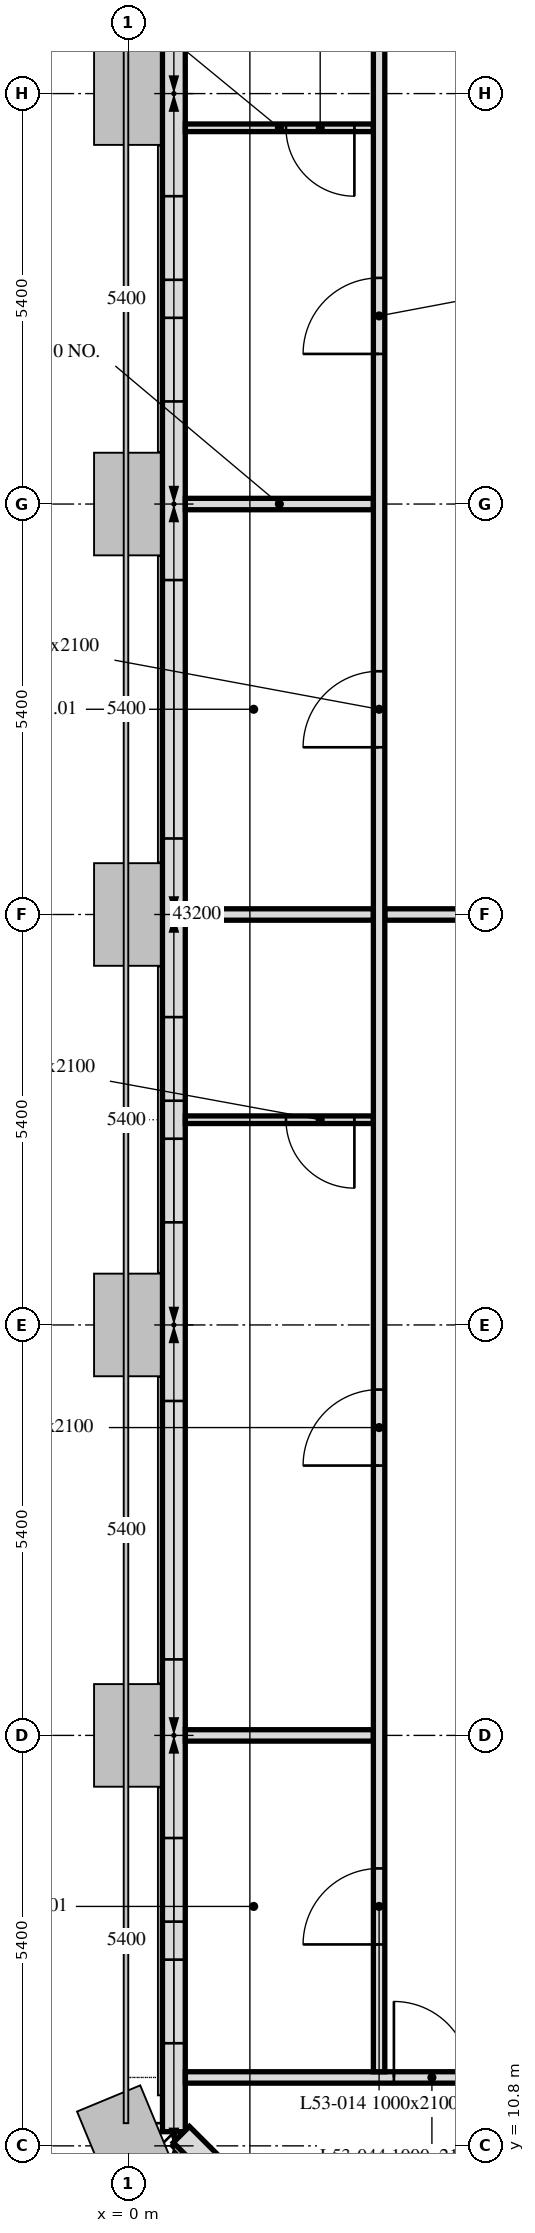
"""IFC4 building model, lengths in metres.
Left out: names, types, materials, properties, quantities, classifications, styles, units other than length and angle.
Written with IfcOpenShell. Run it as: python <this file> out.ifc"""

import sys

from ifc_helpers import new_model, si_unit, direction, frame, frame_2d, origin, place, context, subcontext, project, spatial, rectangle, extrude, element, fill, save


model = new_model("IFC4")
c1 = context("Model", 3, precision=1e-05, world=origin(), true_north=direction((0.0, 1.0)))
c2 = subcontext(c1, "Body", "Model", "MODEL_VIEW")
j1 = project(units=[si_unit("LENGTHUNIT", "METRE"), si_unit("PLANEANGLEUNIT", "RADIAN")], contexts=[c1])
p1 = place(None, origin())
s1 = spatial("IfcSite", under=j1, at=p1, CompositionType="ELEMENT")
p2 = place(p1, origin())
s2 = spatial("IfcBuilding", under=s1, at=p2, CompositionType="ELEMENT")
p3 = place(p2, frame((0.0, 0.0, 213.7)))
s3 = spatial("IfcBuildingStorey", under=s2, at=p3, CompositionType="ELEMENT", Elevation=213.7)
p4 = place(p3, frame((0.6, 43.014, 0.0), z_axis=(0.0, 0.0, 1.0), x_axis=(0.0, -1.0, 0.0)))
e1 = element("IfcWall", 1, at=p4, inside=s3, PredefinedType="SOLIDWALL", context=c2, shape_type="SweptSolid", body=[
    extrude(rectangle(XDim=32.027, YDim=0.3, at=frame_2d((16.014, 0.0))), origin(), (0.0, 0.0, 1.0), 3.0),
])
p5 = place(p4, frame((1.164, 0.0, 0.9)))
e2 = element("IfcOpeningElement", 2, at=p5, cuts=e1, PredefinedType="OPENING", context=c2, shape_type="SweptSolid", body=[
    extrude(rectangle(XDim=1.1, YDim=1.7, at=frame_2d((0.55, 0.85))), frame((0.0, 0.16, 0.0), z_axis=(0.0, -1.0, 0.0), x_axis=(1.0, 0.0, 0.0)), (0.0, 0.0, 1.0), 0.32),
])
p6 = place(p4, frame((3.139, 0.0, 0.9)))
e3 = element("IfcOpeningElement", 3, at=p6, cuts=e1, PredefinedType="OPENING", context=c2, shape_type="SweptSolid", body=[
    extrude(rectangle(XDim=0.65, YDim=1.7, at=frame_2d((0.325, 0.85))), frame((0.0, 0.16, 0.0), z_axis=(0.0, -1.0, 0.0), x_axis=(1.0, 0.0, 0.0)), (0.0, 0.0, 1.0), 0.32),
])
p7 = place(p4, frame((6.564, 0.0, 0.9)))
e4 = element("IfcOpeningElement", 4, at=p7, cuts=e1, PredefinedType="OPENING", context=c2, shape_type="SweptSolid", body=[
    extrude(rectangle(XDim=1.1, YDim=1.7, at=frame_2d((0.55, 0.85))), frame((0.0, 0.16, 0.0), z_axis=(0.0, -1.0, 0.0), x_axis=(1.0, 0.0, 0.0)), (0.0, 0.0, 1.0), 0.32),
])
p8 = place(p4, frame((8.164, 0.0, 0.9)))
e5 = element("IfcOpeningElement", 5, at=p8, cuts=e1, PredefinedType="OPENING", context=c2, shape_type="SweptSolid", body=[
    extrude(rectangle(XDim=1.1, YDim=1.7, at=frame_2d((0.55, 0.85))), frame((0.0, 0.16, 0.0), z_axis=(0.0, -1.0, 0.0), x_axis=(1.0, 0.0, 0.0)), (0.0, 0.0, 1.0), 0.32),
])
p9 = place(p4, frame((11.614, 0.0, 0.9)))
e6 = element("IfcOpeningElement", 6, at=p9, cuts=e1, PredefinedType="OPENING", context=c2, shape_type="SweptSolid", body=[
    extrude(rectangle(XDim=3.4, YDim=1.7, at=frame_2d((1.7, 0.85))), frame((0.0, 0.16, 0.0), z_axis=(0.0, -1.0, 0.0), x_axis=(1.0, 0.0, 0.0)), (0.0, 0.0, 1.0), 0.32),
])
p10 = place(p4, frame((17.364, 0.0, 0.9)))
e7 = element("IfcOpeningElement", 7, at=p10, cuts=e1, PredefinedType="OPENING", context=c2, shape_type="SweptSolid", body=[
    extrude(rectangle(XDim=1.1, YDim=1.7, at=frame_2d((0.55, 0.85))), frame((0.0, 0.16, 0.0), z_axis=(0.0, -1.0, 0.0), x_axis=(1.0, 0.0, 0.0)), (0.0, 0.0, 1.0), 0.32),
])
p11 = place(p4, frame((18.964, 0.0, 0.9)))
e8 = element("IfcOpeningElement", 8, at=p11, cuts=e1, PredefinedType="OPENING", context=c2, shape_type="SweptSolid", body=[
    extrude(rectangle(XDim=1.1, YDim=1.7, at=frame_2d((0.55, 0.85))), frame((0.0, 0.16, 0.0), z_axis=(0.0, -1.0, 0.0), x_axis=(1.0, 0.0, 0.0)), (0.0, 0.0, 1.0), 0.32),
])
p12 = place(p4, frame((22.414, 0.0, 0.9)))
e9 = element("IfcOpeningElement", 9, at=p12, cuts=e1, PredefinedType="OPENING", context=c2, shape_type="SweptSolid", body=[
    extrude(rectangle(XDim=3.4, YDim=1.7, at=frame_2d((1.7, 0.85))), frame((0.0, 0.16, 0.0), z_axis=(0.0, -1.0, 0.0), x_axis=(1.0, 0.0, 0.0)), (0.0, 0.0, 1.0), 0.32),
])
p13 = place(p4, frame((28.164, 0.0, 0.9)))
e10 = element("IfcOpeningElement", 10, at=p13, cuts=e1, PredefinedType="OPENING", context=c2, shape_type="SweptSolid", body=[
    extrude(rectangle(XDim=1.1, YDim=1.7, at=frame_2d((0.55, 0.85))), frame((0.0, 0.16, 0.0), z_axis=(0.0, -1.0, 0.0), x_axis=(1.0, 0.0, 0.0)), (0.0, 0.0, 1.0), 0.32),
])
p14 = place(p4, frame((29.764, 0.0, 0.9)))
e11 = element("IfcOpeningElement", 11, at=p14, cuts=e1, PredefinedType="OPENING", context=c2, shape_type="SweptSolid", body=[
    extrude(rectangle(XDim=1.1, YDim=1.7, at=frame_2d((0.55, 0.85))), frame((0.0, 0.16, 0.0), z_axis=(0.0, -1.0, 0.0), x_axis=(1.0, 0.0, 0.0)), (0.0, 0.0, 1.0), 0.32),
])
p15 = place(p3, frame((0.699, 10.949, 0.0), z_axis=(0.0, 0.0, 1.0), x_axis=(0.707106781187, -0.707106781187, 0.0)))
e12 = element("IfcWall", 12, at=p15, inside=s3, PredefinedType="SOLIDWALL", context=c2, shape_type="SweptSolid", body=[
    extrude(rectangle(XDim=6.86, YDim=0.3, at=frame_2d((3.43, 0.0))), origin(), (0.0, 0.0, 1.0), 3.0),
])
p16 = place(p15, frame((1.73, 0.0, 0.9)))
e13 = element("IfcOpeningElement", 13, at=p16, cuts=e12, PredefinedType="OPENING", context=c2, shape_type="SweptSolid", body=[
    extrude(rectangle(XDim=3.4, YDim=1.7, at=frame_2d((1.7, 0.85))), frame((0.0, 0.16, 0.0), z_axis=(0.0, -1.0, 0.0), x_axis=(1.0, 0.0, 0.0)), (0.0, 0.0, 1.0), 0.32),
])
p17 = place(p3, frame((0.751, 32.4, 0.0), z_axis=(0.0, 0.0, 1.0), x_axis=(1.0, 0.0, 0.0)))
e14 = element("IfcWall", 14, at=p17, inside=s3, PredefinedType="PARTITIONING", context=c2, shape_type="SweptSolid", body=[
    extrude(rectangle(XDim=2.474, YDim=0.15, at=frame_2d((1.237, 0.0))), origin(), (0.0, 0.0, 1.0), 2.4),
])
p18 = place(p3, frame((3.225, 37.35, 0.0), z_axis=(0.0, 0.0, 1.0), x_axis=(-1.0, 0.0, 0.0)))
e15 = element("IfcWall", 15, at=p18, inside=s3, PredefinedType="PARTITIONING", context=c2, shape_type="SweptSolid", body=[
    extrude(rectangle(XDim=2.474, YDim=0.1, at=frame_2d((1.237, 0.0))), origin(), (0.0, 0.0, 1.0), 3.0),
])
p19 = place(p18, frame((0.25, 0.0, 0.0)))
e16 = element("IfcOpeningElement", 16, at=p19, cuts=e15, PredefinedType="OPENING", context=c2, shape_type="SweptSolid", body=[
    extrude(rectangle(XDim=0.9, YDim=2.1, at=frame_2d((0.45, 1.05))), frame((0.0, 0.05, 0.0), z_axis=(0.0, -1.0, 0.0), x_axis=(1.0, 0.0, 0.0)), (0.0, 0.0, 1.0), 0.1),
])
p20 = place(p3, frame((0.751, 27.0, 0.0), z_axis=(0.0, 0.0, 1.0), x_axis=(1.0, 0.0, 0.0)))
e17 = element("IfcWall", 17, at=p20, inside=s3, PredefinedType="PARTITIONING", context=c2, shape_type="SweptSolid", body=[
    extrude(rectangle(XDim=2.474, YDim=0.15, at=frame_2d((1.237, 0.0))), origin(), (0.0, 0.0, 1.0), 2.4),
])
p21 = place(p3, frame((3.375, 27.0, 0.0), z_axis=(0.0, 0.0, 1.0), x_axis=(1.0, 0.0, 0.0)))
e18 = element("IfcWall", 18, at=p21, inside=s3, PredefinedType="PARTITIONING", context=c2, shape_type="SweptSolid", body=[
    extrude(rectangle(XDim=2.025, YDim=0.15, at=frame_2d((1.012, 0.0))), origin(), (0.0, 0.0, 1.0), 2.4),
])
p22 = place(p3, frame((3.225, 16.2, 0.0), z_axis=(0.0, 0.0, 1.0), x_axis=(-1.0, 0.0, 0.0)))
e19 = element("IfcWall", 19, at=p22, inside=s3, PredefinedType="PARTITIONING", context=c2, shape_type="SweptSolid", body=[
    extrude(rectangle(XDim=2.474, YDim=0.15, at=frame_2d((1.237, 0.0))), origin(), (0.0, 0.0, 1.0), 2.4),
])
p23 = place(p3, frame((0.751, 11.7, 0.0), z_axis=(0.0, 0.0, 1.0), x_axis=(1.0, 0.0, 0.0)))
e20 = element("IfcWall", 20, at=p23, inside=s3, PredefinedType="PARTITIONING", context=c2, shape_type="SweptSolid", body=[
    extrude(rectangle(XDim=41.698, YDim=0.15, at=frame_2d((20.849, 0.0))), origin(), (0.0, 0.0, 1.0), 3.0),
])
p24 = place(p23, frame((39.249, 0.0, 0.0)))
e21 = element("IfcOpeningElement", 21, at=p24, cuts=e20, PredefinedType="OPENING", context=c2, shape_type="SweptSolid", body=[
    extrude(rectangle(XDim=1.0, YDim=2.1, at=frame_2d((0.5, 1.05))), frame((0.0, 0.075, 0.0), z_axis=(0.0, -1.0, 0.0), x_axis=(1.0, 0.0, 0.0)), (0.0, 0.0, 1.0), 0.15),
])
p25 = place(p23, frame((27.649, 0.0, 0.0)))
e22 = element("IfcOpeningElement", 22, at=p25, cuts=e20, PredefinedType="OPENING", context=c2, shape_type="SweptSolid", body=[
    extrude(rectangle(XDim=1.0, YDim=2.1, at=frame_2d((0.5, 1.05))), frame((0.0, 0.075, 0.0), z_axis=(0.0, -1.0, 0.0), x_axis=(1.0, 0.0, 0.0)), (0.0, 0.0, 1.0), 0.15),
])
p26 = place(p23, frame((22.249, 0.0, 0.0)))
e23 = element("IfcOpeningElement", 23, at=p26, cuts=e20, PredefinedType="OPENING", context=c2, shape_type="SweptSolid", body=[
    extrude(rectangle(XDim=1.0, YDim=2.1, at=frame_2d((0.5, 1.05))), frame((0.0, 0.075, 0.0), z_axis=(0.0, -1.0, 0.0), x_axis=(1.0, 0.0, 0.0)), (0.0, 0.0, 1.0), 0.15),
])
p27 = place(p23, frame((16.849, 0.0, 0.0)))
e24 = element("IfcOpeningElement", 24, at=p27, cuts=e20, PredefinedType="OPENING", context=c2, shape_type="SweptSolid", body=[
    extrude(rectangle(XDim=1.0, YDim=2.1, at=frame_2d((0.5, 1.05))), frame((0.0, 0.075, 0.0), z_axis=(0.0, -1.0, 0.0), x_axis=(1.0, 0.0, 0.0)), (0.0, 0.0, 1.0), 0.15),
])
p28 = place(p23, frame((11.449, 0.0, 0.0)))
e25 = element("IfcOpeningElement", 25, at=p28, cuts=e20, PredefinedType="OPENING", context=c2, shape_type="SweptSolid", body=[
    extrude(rectangle(XDim=1.0, YDim=2.1, at=frame_2d((0.5, 1.05))), frame((0.0, 0.075, 0.0), z_axis=(0.0, -1.0, 0.0), x_axis=(1.0, 0.0, 0.0)), (0.0, 0.0, 1.0), 0.15),
])
p29 = place(p23, frame((2.744, 0.0, 0.0)))
e26 = element("IfcOpeningElement", 26, at=p29, cuts=e20, PredefinedType="OPENING", context=c2, shape_type="SweptSolid", body=[
    extrude(rectangle(XDim=1.0, YDim=2.1, at=frame_2d((0.5, 1.05))), frame((0.0, 0.075, 0.0), z_axis=(0.0, -1.0, 0.0), x_axis=(1.0, 0.0, 0.0)), (0.0, 0.0, 1.0), 0.15),
])
p30 = place(p3, frame((3.225, 24.3, 0.0), z_axis=(0.0, 0.0, 1.0), x_axis=(-1.0, 0.0, 0.0)))
e27 = element("IfcWall", 27, at=p30, inside=s3, PredefinedType="PARTITIONING", context=c2, shape_type="SweptSolid", body=[
    extrude(rectangle(XDim=2.474, YDim=0.1, at=frame_2d((1.237, 0.0))), origin(), (0.0, 0.0, 1.0), 3.0),
])
p31 = place(p30, frame((0.25, 0.0, 0.0)))
e28 = element("IfcOpeningElement", 28, at=p31, cuts=e27, PredefinedType="OPENING", context=c2, shape_type="SweptSolid", body=[
    extrude(rectangle(XDim=0.9, YDim=2.1, at=frame_2d((0.45, 1.05))), frame((0.0, 0.05, 0.0), z_axis=(0.0, -1.0, 0.0), x_axis=(1.0, 0.0, 0.0)), (0.0, 0.0, 1.0), 0.1),
])
p32 = place(p3, frame((3.3, 11.775, 0.0), z_axis=(0.0, 0.0, 1.0), x_axis=(0.0, 1.0, 0.0)))
e29 = element("IfcWall", 29, at=p32, inside=s3, PredefinedType="PARTITIONING", context=c2, shape_type="SweptSolid", body=[
    extrude(rectangle(XDim=28.2, YDim=0.15, at=frame_2d((14.1, 0.0))), origin(), (0.0, 0.0, 1.0), 2.4),
])
p33 = place(p32, frame((17.425, 0.0, 0.0)))
e30 = element("IfcOpeningElement", 30, at=p33, cuts=e29, PredefinedType="OPENING", context=c2, shape_type="SweptSolid", body=[
    extrude(rectangle(XDim=1.0, YDim=2.1, at=frame_2d((0.5, 1.05))), frame((0.0, 0.075, 0.0), z_axis=(0.0, -1.0, 0.0), x_axis=(1.0, 0.0, 0.0)), (0.0, 0.0, 1.0), 0.15),
])
p34 = place(p32, frame((1.675, 0.0, 0.0)))
e31 = element("IfcOpeningElement", 31, at=p34, cuts=e29, PredefinedType="OPENING", context=c2, shape_type="SweptSolid", body=[
    extrude(rectangle(XDim=1.0, YDim=2.1, at=frame_2d((0.5, 1.05))), frame((0.0, 0.075, 0.0), z_axis=(0.0, -1.0, 0.0), x_axis=(1.0, 0.0, 0.0)), (0.0, 0.0, 1.0), 0.15),
])
p35 = place(p32, frame((22.6, 0.0, 0.0)))
e32 = element("IfcOpeningElement", 32, at=p35, cuts=e29, PredefinedType="OPENING", context=c2, shape_type="SweptSolid", body=[
    extrude(rectangle(XDim=1.0, YDim=2.1, at=frame_2d((0.5, 1.05))), frame((0.0, 0.075, 0.0), z_axis=(0.0, -1.0, 0.0), x_axis=(1.0, 0.0, 0.0)), (0.0, 0.0, 1.0), 0.15),
])
p36 = place(p32, frame((7.975, 0.0, 0.0)))
e33 = element("IfcOpeningElement", 33, at=p36, cuts=e29, PredefinedType="OPENING", context=c2, shape_type="SweptSolid", body=[
    extrude(rectangle(XDim=1.0, YDim=2.1, at=frame_2d((0.5, 1.05))), frame((0.0, 0.075, 0.0), z_axis=(0.0, -1.0, 0.0), x_axis=(1.0, 0.0, 0.0)), (0.0, 0.0, 1.0), 0.15),
])
p37 = place(p7, origin())
e34 = element("IfcWindow", 34, at=p37, inside=s3, PartitioningType="SINGLE_PANEL", PredefinedType="WINDOW", context=c2, shape_type="SweptSolid", body=[
    extrude(rectangle(XDim=1.1, YDim=1.7, at=frame_2d((0.55, 0.85))), frame((0.0, 0.03, 0.0), z_axis=(0.0, -1.0, 0.0), x_axis=(1.0, 0.0, 0.0)), (0.0, 0.0, 1.0), 0.06),
])
fill(e4, e34)
p38 = place(p8, origin())
e35 = element("IfcWindow", 35, at=p38, inside=s3, PartitioningType="SINGLE_PANEL", PredefinedType="WINDOW", context=c2, shape_type="SweptSolid", body=[
    extrude(rectangle(XDim=1.1, YDim=1.7, at=frame_2d((0.55, 0.85))), frame((0.0, 0.03, 0.0), z_axis=(0.0, -1.0, 0.0), x_axis=(1.0, 0.0, 0.0)), (0.0, 0.0, 1.0), 0.06),
])
fill(e5, e35)
p39 = place(p9, origin())
e36 = element("IfcWindow", 36, at=p39, inside=s3, PartitioningType="SINGLE_PANEL", PredefinedType="WINDOW", context=c2, shape_type="SweptSolid", body=[
    extrude(rectangle(XDim=3.4, YDim=1.7, at=frame_2d((1.7, 0.85))), frame((0.0, 0.03, 0.0), z_axis=(0.0, -1.0, 0.0), x_axis=(1.0, 0.0, 0.0)), (0.0, 0.0, 1.0), 0.06),
])
fill(e6, e36)
p40 = place(p10, origin())
e37 = element("IfcWindow", 37, at=p40, inside=s3, PartitioningType="SINGLE_PANEL", PredefinedType="WINDOW", context=c2, shape_type="SweptSolid", body=[
    extrude(rectangle(XDim=1.1, YDim=1.7, at=frame_2d((0.55, 0.85))), frame((0.0, 0.03, 0.0), z_axis=(0.0, -1.0, 0.0), x_axis=(1.0, 0.0, 0.0)), (0.0, 0.0, 1.0), 0.06),
])
fill(e7, e37)
p41 = place(p11, origin())
e38 = element("IfcWindow", 38, at=p41, inside=s3, PartitioningType="SINGLE_PANEL", PredefinedType="WINDOW", context=c2, shape_type="SweptSolid", body=[
    extrude(rectangle(XDim=1.1, YDim=1.7, at=frame_2d((0.55, 0.85))), frame((0.0, 0.03, 0.0), z_axis=(0.0, -1.0, 0.0), x_axis=(1.0, 0.0, 0.0)), (0.0, 0.0, 1.0), 0.06),
])
fill(e8, e38)
p42 = place(p12, origin())
e39 = element("IfcWindow", 39, at=p42, inside=s3, PartitioningType="SINGLE_PANEL", PredefinedType="WINDOW", context=c2, shape_type="SweptSolid", body=[
    extrude(rectangle(XDim=3.4, YDim=1.7, at=frame_2d((1.7, 0.85))), frame((0.0, 0.03, 0.0), z_axis=(0.0, -1.0, 0.0), x_axis=(1.0, 0.0, 0.0)), (0.0, 0.0, 1.0), 0.06),
])
fill(e9, e39)
p43 = place(p13, origin())
e40 = element("IfcWindow", 40, at=p43, inside=s3, PartitioningType="SINGLE_PANEL", PredefinedType="WINDOW", context=c2, shape_type="SweptSolid", body=[
    extrude(rectangle(XDim=1.1, YDim=1.7, at=frame_2d((0.55, 0.85))), frame((0.0, 0.03, 0.0), z_axis=(0.0, -1.0, 0.0), x_axis=(1.0, 0.0, 0.0)), (0.0, 0.0, 1.0), 0.06),
])
fill(e10, e40)
p44 = place(p14, origin())
e41 = element("IfcWindow", 41, at=p44, inside=s3, PartitioningType="SINGLE_PANEL", PredefinedType="WINDOW", context=c2, shape_type="SweptSolid", body=[
    extrude(rectangle(XDim=1.1, YDim=1.7, at=frame_2d((0.55, 0.85))), frame((0.0, 0.03, 0.0), z_axis=(0.0, -1.0, 0.0), x_axis=(1.0, 0.0, 0.0)), (0.0, 0.0, 1.0), 0.06),
])
fill(e11, e41)
p45 = place(p19, origin())
e42 = element("IfcDoor", 42, at=p45, inside=s3, OperationType="SINGLE_SWING_RIGHT", PredefinedType="DOOR", context=c2, shape_type="SweptSolid", body=[
    extrude(rectangle(XDim=0.9, YDim=2.1, at=frame_2d((0.45, 1.05))), frame((0.0, 0.025, 0.0), z_axis=(0.0, -1.0, 0.0), x_axis=(1.0, 0.0, 0.0)), (0.0, 0.0, 1.0), 0.05),
])
fill(e16, e42)
p46 = place(p33, origin())
e43 = element("IfcDoor", 43, at=p46, inside=s3, OperationType="SINGLE_SWING_RIGHT", PredefinedType="DOOR", context=c2, shape_type="SweptSolid", body=[
    extrude(rectangle(XDim=1.0, YDim=2.1, at=frame_2d((0.5, 1.05))), frame((0.0, 0.025, 0.0), z_axis=(0.0, -1.0, 0.0), x_axis=(1.0, 0.0, 0.0)), (0.0, 0.0, 1.0), 0.05),
])
fill(e30, e43)
p47 = place(p34, origin())
e44 = element("IfcDoor", 44, at=p47, inside=s3, OperationType="SINGLE_SWING_LEFT", PredefinedType="DOOR", context=c2, shape_type="SweptSolid", body=[
    extrude(rectangle(XDim=1.0, YDim=2.1, at=frame_2d((0.5, 1.05))), frame((0.0, 0.025, 0.0), z_axis=(0.0, -1.0, 0.0), x_axis=(1.0, 0.0, 0.0)), (0.0, 0.0, 1.0), 0.05),
])
fill(e31, e44)
p48 = place(p31, origin())
e45 = element("IfcDoor", 45, at=p48, inside=s3, OperationType="SINGLE_SWING_LEFT", PredefinedType="DOOR", context=c2, shape_type="SweptSolid", body=[
    extrude(rectangle(XDim=0.9, YDim=2.1, at=frame_2d((0.45, 1.05))), frame((0.0, 0.025, 0.0), z_axis=(0.0, -1.0, 0.0), x_axis=(1.0, 0.0, 0.0)), (0.0, 0.0, 1.0), 0.05),
])
fill(e28, e45)
p49 = place(p35, origin())
e46 = element("IfcDoor", 46, at=p49, inside=s3, OperationType="SINGLE_SWING_LEFT", PredefinedType="DOOR", context=c2, shape_type="SweptSolid", body=[
    extrude(rectangle(XDim=1.0, YDim=2.1, at=frame_2d((0.5, 1.05))), frame((0.0, 0.025, 0.0), z_axis=(0.0, -1.0, 0.0), x_axis=(1.0, 0.0, 0.0)), (0.0, 0.0, 1.0), 0.05),
])
fill(e32, e46)
p50 = place(p29, origin())
e47 = element("IfcDoor", 47, at=p50, inside=s3, OperationType="SINGLE_SWING_RIGHT", PredefinedType="DOOR", context=c2, shape_type="SweptSolid", body=[
    extrude(rectangle(XDim=1.0, YDim=2.1, at=frame_2d((0.5, 1.05))), frame((0.0, 0.025, 0.0), z_axis=(0.0, -1.0, 0.0), x_axis=(1.0, 0.0, 0.0)), (0.0, 0.0, 1.0), 0.05),
])
fill(e26, e47)
p51 = place(p36, origin())
e48 = element("IfcDoor", 48, at=p51, inside=s3, OperationType="SINGLE_SWING_LEFT", PredefinedType="DOOR", context=c2, shape_type="SweptSolid", body=[
    extrude(rectangle(XDim=1.0, YDim=2.1, at=frame_2d((0.5, 1.05))), frame((0.0, 0.025, 0.0), z_axis=(0.0, -1.0, 0.0), x_axis=(1.0, 0.0, 0.0)), (0.0, 0.0, 1.0), 0.05),
])
fill(e33, e48)
save(model, sys.argv[1])
